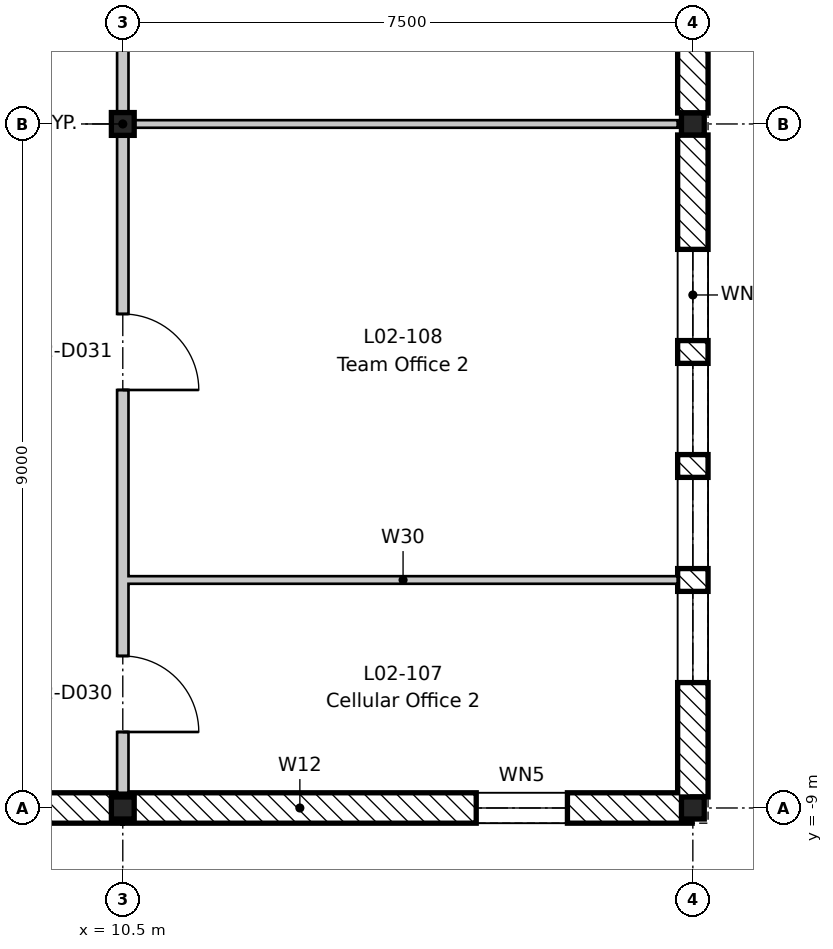
"""IFC4 building model, lengths in metres.
Left out: names, types, materials, properties, quantities, classifications, styles, units other than length and angle.
Written with IfcOpenShell. Run it as: python <this file> out.ifc"""

import sys

from ifc_helpers import new_model, si_unit, direction, frame, frame_2d, origin, origin_2d, place, context, subcontext, project, spatial, rectangle, i_section, extrude, element, fill, save


model = new_model("IFC4")
c1 = context("Model", 3, precision=1e-05, world=origin(), true_north=direction((0.0, 1.0)))
c2 = subcontext(c1, "Body", "Model", "MODEL_VIEW")
j1 = project(units=[si_unit("LENGTHUNIT", "METRE"), si_unit("PLANEANGLEUNIT", "RADIAN")], contexts=[c1])
p1 = place(None, origin())
s1 = spatial("IfcSite", under=j1, at=p1, CompositionType="ELEMENT")
p2 = place(p1, origin())
s2 = spatial("IfcBuilding", under=s1, at=p2, CompositionType="ELEMENT")
p3 = place(p2, frame((0.0, 0.0, 9.9)))
s3 = spatial("IfcBuildingStorey", under=s2, at=p3, CompositionType="ELEMENT", Elevation=9.9)
p4 = place(p3, frame((10.5, -9.0, -0.2), z_axis=(0.0, 0.0, 1.0), x_axis=(1.0, 0.0, 0.0)))
e1 = element("IfcColumn", 1, at=p4, inside=s3, PredefinedType="COLUMN", context=c2, shape_type="SweptSolid", body=[
    extrude(i_section(OverallWidth=0.3, OverallDepth=0.29, WebThickness=0.009, FlangeThickness=0.014, FilletRadius=0.027, at=origin_2d()), origin(), (0.0, 0.0, 1.0), 4.5),
])
p5 = place(p3, frame((10.5, 0.0, -0.2), z_axis=(0.0, 0.0, 1.0), x_axis=(1.0, 0.0, 0.0)))
e2 = element("IfcColumn", 2, at=p5, inside=s3, PredefinedType="COLUMN", context=c2, shape_type="SweptSolid", body=[
    extrude(i_section(OverallWidth=0.3, OverallDepth=0.3, WebThickness=0.011, FlangeThickness=0.019, FilletRadius=0.027, at=origin_2d()), origin(), (0.0, 0.0, 1.0), 4.5),
])
for number, where, z_axis, x_axis in (
    (3, (18.0, -9.0, -0.2), (0.0, 0.0, 1.0), (1.0, 0.0, 0.0)),
    (4, (18.0, 0.0, -0.2), (0.0, 0.0, 1.0), (1.0, 0.0, 0.0)),
):
    element("IfcColumn", number, at=place(p3, frame(where, z_axis=z_axis, x_axis=x_axis)), inside=s3, PredefinedType="COLUMN", context=c2, shape_type="SweptSolid", body=[
        extrude(i_section(OverallWidth=0.3, OverallDepth=0.29, WebThickness=0.009, FlangeThickness=0.014, FilletRadius=0.027, at=origin_2d()), origin(), (0.0, 0.0, 1.0), 4.5),
    ])
p6 = place(p3, frame((18.0, -0.145, 0.0), z_axis=(0.0, 0.0, 1.0), x_axis=(0.0, -1.0, 0.0)))
e5 = element("IfcWall", 5, at=p6, inside=s3, PredefinedType="STANDARD", context=c2, shape_type="SweptSolid", body=[
    extrude(rectangle(XDim=8.71, YDim=0.4, at=frame_2d((4.355, 0.0))), origin(), (0.0, 0.0, 1.0), 3.9),
])
p7 = place(p6, frame((6.005, 0.0, 0.6)))
e6 = element("IfcOpeningElement", 6, at=p7, cuts=e5, PredefinedType="OPENING", context=c2, shape_type="SweptSolid", body=[
    extrude(rectangle(XDim=1.2, YDim=3.0, at=frame_2d((0.6, 1.5))), frame((0.0, 0.21, 0.0), z_axis=(0.0, -1.0, 0.0), x_axis=(1.0, 0.0, 0.0)), (0.0, 0.0, 1.0), 0.42),
])
p8 = place(p6, frame((4.505, 0.0, 0.6)))
e7 = element("IfcOpeningElement", 7, at=p8, cuts=e5, PredefinedType="OPENING", context=c2, shape_type="SweptSolid", body=[
    extrude(rectangle(XDim=1.2, YDim=3.0, at=frame_2d((0.6, 1.5))), frame((0.0, 0.21, 0.0), z_axis=(0.0, -1.0, 0.0), x_axis=(1.0, 0.0, 0.0)), (0.0, 0.0, 1.0), 0.42),
])
p9 = place(p6, frame((3.005, 0.0, 0.6)))
e8 = element("IfcOpeningElement", 8, at=p9, cuts=e5, PredefinedType="OPENING", context=c2, shape_type="SweptSolid", body=[
    extrude(rectangle(XDim=1.2, YDim=3.0, at=frame_2d((0.6, 1.5))), frame((0.0, 0.21, 0.0), z_axis=(0.0, -1.0, 0.0), x_axis=(1.0, 0.0, 0.0)), (0.0, 0.0, 1.0), 0.42),
])
p10 = place(p6, frame((1.505, 0.0, 0.6)))
e9 = element("IfcOpeningElement", 9, at=p10, cuts=e5, PredefinedType="OPENING", context=c2, shape_type="SweptSolid", body=[
    extrude(rectangle(XDim=1.2, YDim=3.0, at=frame_2d((0.6, 1.5))), frame((0.0, 0.21, 0.0), z_axis=(0.0, -1.0, 0.0), x_axis=(1.0, 0.0, 0.0)), (0.0, 0.0, 1.0), 0.42),
])
p11 = place(p3, frame((18.0, 8.855, 0.0), z_axis=(0.0, 0.0, 1.0), x_axis=(0.0, -1.0, 0.0)))
e10 = element("IfcWall", 10, at=p11, inside=s3, PredefinedType="STANDARD", context=c2, shape_type="SweptSolid", body=[
    extrude(rectangle(XDim=8.71, YDim=0.4, at=frame_2d((4.355, 0.0))), origin(), (0.0, 0.0, 1.0), 3.9),
])
p12 = place(p11, frame((6.005, 0.0, 0.6)))
e11 = element("IfcOpeningElement", 11, at=p12, cuts=e10, PredefinedType="OPENING", context=c2, shape_type="SweptSolid", body=[
    extrude(rectangle(XDim=1.2, YDim=3.0, at=frame_2d((0.6, 1.5))), frame((0.0, 0.21, 0.0), z_axis=(0.0, -1.0, 0.0), x_axis=(1.0, 0.0, 0.0)), (0.0, 0.0, 1.0), 0.42),
])
p13 = place(p11, frame((4.505, 0.0, 0.6)))
e12 = element("IfcOpeningElement", 12, at=p13, cuts=e10, PredefinedType="OPENING", context=c2, shape_type="SweptSolid", body=[
    extrude(rectangle(XDim=1.2, YDim=3.0, at=frame_2d((0.6, 1.5))), frame((0.0, 0.21, 0.0), z_axis=(0.0, -1.0, 0.0), x_axis=(1.0, 0.0, 0.0)), (0.0, 0.0, 1.0), 0.42),
])
p14 = place(p11, frame((3.005, 0.0, 0.6)))
e13 = element("IfcOpeningElement", 13, at=p14, cuts=e10, PredefinedType="OPENING", context=c2, shape_type="SweptSolid", body=[
    extrude(rectangle(XDim=1.2, YDim=3.0, at=frame_2d((0.6, 1.5))), frame((0.0, 0.21, 0.0), z_axis=(0.0, -1.0, 0.0), x_axis=(1.0, 0.0, 0.0)), (0.0, 0.0, 1.0), 0.42),
])
p15 = place(p11, frame((1.505, 0.0, 0.6)))
e14 = element("IfcOpeningElement", 14, at=p15, cuts=e10, PredefinedType="OPENING", context=c2, shape_type="SweptSolid", body=[
    extrude(rectangle(XDim=1.2, YDim=3.0, at=frame_2d((0.6, 1.5))), frame((0.0, 0.21, 0.0), z_axis=(0.0, -1.0, 0.0), x_axis=(1.0, 0.0, 0.0)), (0.0, 0.0, 1.0), 0.42),
])
p16 = place(p3, frame((10.491, -9.0, 0.0), z_axis=(0.0, 0.0, 1.0), x_axis=(-1.0, 0.0, 0.0)))
e15 = element("IfcWall", 15, at=p16, inside=s3, PredefinedType="STANDARD", context=c2, shape_type="SweptSolid", body=[
    extrude(rectangle(XDim=2.981, YDim=0.4, at=frame_2d((1.491, 0.0))), origin(), (0.0, 0.0, 1.0), 4.1),
])
p17 = place(p3, frame((17.991, -9.0, 0.0), z_axis=(0.0, 0.0, 1.0), x_axis=(-1.0, 0.0, 0.0)))
e16 = element("IfcWall", 16, at=p17, inside=s3, PredefinedType="STANDARD", context=c2, shape_type="SweptSolid", body=[
    extrude(rectangle(XDim=7.481, YDim=0.4, at=frame_2d((3.741, 0.0))), origin(), (0.0, 0.0, 1.0), 3.97),
])
p18 = place(p17, frame((1.641, 0.0, 0.6)))
e17 = element("IfcOpeningElement", 17, at=p18, cuts=e16, PredefinedType="OPENING", context=c2, shape_type="SweptSolid", body=[
    extrude(rectangle(XDim=1.2, YDim=3.0, at=frame_2d((0.6, 1.5))), frame((0.0, 0.21, 0.0), z_axis=(0.0, -1.0, 0.0), x_axis=(1.0, 0.0, 0.0)), (0.0, 0.0, 1.0), 0.42),
])
p19 = place(p3, frame((10.575, -6.0, 0.0), z_axis=(0.0, 0.0, 1.0), x_axis=(1.0, 0.0, 0.0)))
e18 = element("IfcWall", 18, at=p19, inside=s3, PredefinedType="PARTITIONING", context=c2, shape_type="SweptSolid", body=[
    extrude(rectangle(XDim=7.225, YDim=0.1, at=frame_2d((3.613, 0.0))), origin(), (0.0, 0.0, 1.0), 4.3),
])
p20 = place(p3, frame((10.575, 0.0, 0.0), z_axis=(0.0, 0.0, 1.0), x_axis=(1.0, 0.0, 0.0)))
e19 = element("IfcWall", 19, at=p20, inside=s3, PredefinedType="PARTITIONING", context=c2, shape_type="SweptSolid", body=[
    extrude(rectangle(XDim=7.225, YDim=0.1, at=frame_2d((3.613, 0.0))), origin(), (0.0, 0.0, 1.0), 3.95),
])
p21 = place(p3, frame((10.5, -8.8, 0.0), z_axis=(0.0, 0.0, 1.0), x_axis=(0.0, 1.0, 0.0)))
e20 = element("IfcWall", 20, at=p21, inside=s3, PredefinedType="PARTITIONING", context=c2, shape_type="SweptSolid", body=[
    extrude(rectangle(XDim=79.3, YDim=0.15, at=frame_2d((39.65, 0.0))), origin(), (0.0, 0.0, 1.0), 3.78),
])
p22 = place(p21, frame((0.8, 0.0, 0.0)))
e21 = element("IfcOpeningElement", 21, at=p22, cuts=e20, PredefinedType="OPENING", context=c2, shape_type="SweptSolid", body=[
    extrude(rectangle(XDim=1.0, YDim=2.1, at=frame_2d((0.5, 1.05))), frame((0.0, 0.085, 0.0), z_axis=(0.0, -1.0, 0.0), x_axis=(1.0, 0.0, 0.0)), (0.0, 0.0, 1.0), 0.17),
])
p23 = place(p21, frame((5.3, 0.0, 0.0)))
e22 = element("IfcOpeningElement", 22, at=p23, cuts=e20, PredefinedType="OPENING", context=c2, shape_type="SweptSolid", body=[
    extrude(rectangle(XDim=1.0, YDim=2.1, at=frame_2d((0.5, 1.05))), frame((0.0, 0.085, 0.0), z_axis=(0.0, -1.0, 0.0), x_axis=(1.0, 0.0, 0.0)), (0.0, 0.0, 1.0), 0.17),
])
p24 = place(p21, frame((9.8, 0.0, 0.0)))
e23 = element("IfcOpeningElement", 23, at=p24, cuts=e20, PredefinedType="OPENING", context=c2, shape_type="SweptSolid", body=[
    extrude(rectangle(XDim=1.0, YDim=2.1, at=frame_2d((0.5, 1.05))), frame((0.0, 0.085, 0.0), z_axis=(0.0, -1.0, 0.0), x_axis=(1.0, 0.0, 0.0)), (0.0, 0.0, 1.0), 0.17),
])
p25 = place(p21, frame((12.8, 0.0, 0.0)))
e24 = element("IfcOpeningElement", 24, at=p25, cuts=e20, PredefinedType="OPENING", context=c2, shape_type="SweptSolid", body=[
    extrude(rectangle(XDim=1.0, YDim=2.1, at=frame_2d((0.5, 1.05))), frame((0.0, 0.085, 0.0), z_axis=(0.0, -1.0, 0.0), x_axis=(1.0, 0.0, 0.0)), (0.0, 0.0, 1.0), 0.17),
])
p26 = place(p21, frame((15.8, 0.0, 0.0)))
e25 = element("IfcOpeningElement", 25, at=p26, cuts=e20, PredefinedType="OPENING", context=c2, shape_type="SweptSolid", body=[
    extrude(rectangle(XDim=1.0, YDim=2.1, at=frame_2d((0.5, 1.05))), frame((0.0, 0.085, 0.0), z_axis=(0.0, -1.0, 0.0), x_axis=(1.0, 0.0, 0.0)), (0.0, 0.0, 1.0), 0.17),
])
p27 = place(p21, frame((20.3, 0.0, 0.0)))
e26 = element("IfcOpeningElement", 26, at=p27, cuts=e20, PredefinedType="OPENING", context=c2, shape_type="SweptSolid", body=[
    extrude(rectangle(XDim=1.0, YDim=2.1, at=frame_2d((0.5, 1.05))), frame((0.0, 0.085, 0.0), z_axis=(0.0, -1.0, 0.0), x_axis=(1.0, 0.0, 0.0)), (0.0, 0.0, 1.0), 0.17),
])
p28 = place(p21, frame((24.8, 0.0, 0.0)))
e27 = element("IfcOpeningElement", 27, at=p28, cuts=e20, PredefinedType="OPENING", context=c2, shape_type="SweptSolid", body=[
    extrude(rectangle(XDim=1.0, YDim=2.1, at=frame_2d((0.5, 1.05))), frame((0.0, 0.085, 0.0), z_axis=(0.0, -1.0, 0.0), x_axis=(1.0, 0.0, 0.0)), (0.0, 0.0, 1.0), 0.17),
])
p29 = place(p21, frame((27.8, 0.0, 0.0)))
e28 = element("IfcOpeningElement", 28, at=p29, cuts=e20, PredefinedType="OPENING", context=c2, shape_type="SweptSolid", body=[
    extrude(rectangle(XDim=1.0, YDim=2.1, at=frame_2d((0.5, 1.05))), frame((0.0, 0.085, 0.0), z_axis=(0.0, -1.0, 0.0), x_axis=(1.0, 0.0, 0.0)), (0.0, 0.0, 1.0), 0.17),
])
p30 = place(p21, frame((32.3, 0.0, 0.0)))
e29 = element("IfcOpeningElement", 29, at=p30, cuts=e20, PredefinedType="OPENING", context=c2, shape_type="SweptSolid", body=[
    extrude(rectangle(XDim=1.0, YDim=2.1, at=frame_2d((0.5, 1.05))), frame((0.0, 0.085, 0.0), z_axis=(0.0, -1.0, 0.0), x_axis=(1.0, 0.0, 0.0)), (0.0, 0.0, 1.0), 0.17),
])
p31 = place(p21, frame((38.3, 0.0, 0.0)))
e30 = element("IfcOpeningElement", 30, at=p31, cuts=e20, PredefinedType="OPENING", context=c2, shape_type="SweptSolid", body=[
    extrude(rectangle(XDim=1.0, YDim=2.1, at=frame_2d((0.5, 1.05))), frame((0.0, 0.085, 0.0), z_axis=(0.0, -1.0, 0.0), x_axis=(1.0, 0.0, 0.0)), (0.0, 0.0, 1.0), 0.17),
])
p32 = place(p21, frame((42.8, 0.0, 0.0)))
e31 = element("IfcOpeningElement", 31, at=p32, cuts=e20, PredefinedType="OPENING", context=c2, shape_type="SweptSolid", body=[
    extrude(rectangle(XDim=1.0, YDim=2.1, at=frame_2d((0.5, 1.05))), frame((0.0, 0.085, 0.0), z_axis=(0.0, -1.0, 0.0), x_axis=(1.0, 0.0, 0.0)), (0.0, 0.0, 1.0), 0.17),
])
p33 = place(p21, frame((45.8, 0.0, 0.0)))
e32 = element("IfcOpeningElement", 32, at=p33, cuts=e20, PredefinedType="OPENING", context=c2, shape_type="SweptSolid", body=[
    extrude(rectangle(XDim=1.0, YDim=2.1, at=frame_2d((0.5, 1.05))), frame((0.0, 0.085, 0.0), z_axis=(0.0, -1.0, 0.0), x_axis=(1.0, 0.0, 0.0)), (0.0, 0.0, 1.0), 0.17),
])
p34 = place(p21, frame((50.3, 0.0, 0.0)))
e33 = element("IfcOpeningElement", 33, at=p34, cuts=e20, PredefinedType="OPENING", context=c2, shape_type="SweptSolid", body=[
    extrude(rectangle(XDim=1.0, YDim=2.1, at=frame_2d((0.5, 1.05))), frame((0.0, 0.085, 0.0), z_axis=(0.0, -1.0, 0.0), x_axis=(1.0, 0.0, 0.0)), (0.0, 0.0, 1.0), 0.17),
])
p35 = place(p21, frame((54.8, 0.0, 0.0)))
e34 = element("IfcOpeningElement", 34, at=p35, cuts=e20, PredefinedType="OPENING", context=c2, shape_type="SweptSolid", body=[
    extrude(rectangle(XDim=1.0, YDim=2.1, at=frame_2d((0.5, 1.05))), frame((0.0, 0.085, 0.0), z_axis=(0.0, -1.0, 0.0), x_axis=(1.0, 0.0, 0.0)), (0.0, 0.0, 1.0), 0.17),
])
p36 = place(p21, frame((57.8, 0.0, 0.0)))
e35 = element("IfcOpeningElement", 35, at=p36, cuts=e20, PredefinedType="OPENING", context=c2, shape_type="SweptSolid", body=[
    extrude(rectangle(XDim=1.0, YDim=2.1, at=frame_2d((0.5, 1.05))), frame((0.0, 0.085, 0.0), z_axis=(0.0, -1.0, 0.0), x_axis=(1.0, 0.0, 0.0)), (0.0, 0.0, 1.0), 0.17),
])
p37 = place(p21, frame((63.6, 0.0, 0.0)))
e36 = element("IfcOpeningElement", 36, at=p37, cuts=e20, PredefinedType="OPENING", context=c2, shape_type="SweptSolid", body=[
    extrude(rectangle(XDim=1.4, YDim=2.1, at=frame_2d((0.7, 1.05))), frame((0.0, 0.085, 0.0), z_axis=(0.0, -1.0, 0.0), x_axis=(1.0, 0.0, 0.0)), (0.0, 0.0, 1.0), 0.17),
])
p38 = place(p21, frame((69.8, 0.0, 0.0)))
e37 = element("IfcOpeningElement", 37, at=p38, cuts=e20, PredefinedType="OPENING", context=c2, shape_type="SweptSolid", body=[
    extrude(rectangle(XDim=1.0, YDim=2.1, at=frame_2d((0.5, 1.05))), frame((0.0, 0.085, 0.0), z_axis=(0.0, -1.0, 0.0), x_axis=(1.0, 0.0, 0.0)), (0.0, 0.0, 1.0), 0.17),
])
p39 = place(p21, frame((72.8, 0.0, 0.0)))
e38 = element("IfcOpeningElement", 38, at=p39, cuts=e20, PredefinedType="OPENING", context=c2, shape_type="SweptSolid", body=[
    extrude(rectangle(XDim=1.0, YDim=2.1, at=frame_2d((0.5, 1.05))), frame((0.0, 0.085, 0.0), z_axis=(0.0, -1.0, 0.0), x_axis=(1.0, 0.0, 0.0)), (0.0, 0.0, 1.0), 0.17),
])
p40 = place(p7, origin())
e39 = element("IfcWindow", 39, at=p40, inside=s3, PartitioningType="SINGLE_PANEL", PredefinedType="WINDOW", context=c2, shape_type="SweptSolid", body=[
    extrude(rectangle(XDim=1.2, YDim=3.0, at=frame_2d((0.6, 1.5))), frame((0.0, 0.03, 0.0), z_axis=(0.0, -1.0, 0.0), x_axis=(1.0, 0.0, 0.0)), (0.0, 0.0, 1.0), 0.06),
])
fill(e6, e39)
p41 = place(p8, origin())
e40 = element("IfcWindow", 40, at=p41, inside=s3, PartitioningType="SINGLE_PANEL", PredefinedType="WINDOW", context=c2, shape_type="SweptSolid", body=[
    extrude(rectangle(XDim=1.2, YDim=3.0, at=frame_2d((0.6, 1.5))), frame((0.0, 0.03, 0.0), z_axis=(0.0, -1.0, 0.0), x_axis=(1.0, 0.0, 0.0)), (0.0, 0.0, 1.0), 0.06),
])
fill(e7, e40)
p42 = place(p9, origin())
e41 = element("IfcWindow", 41, at=p42, inside=s3, PartitioningType="SINGLE_PANEL", PredefinedType="WINDOW", context=c2, shape_type="SweptSolid", body=[
    extrude(rectangle(XDim=1.2, YDim=3.0, at=frame_2d((0.6, 1.5))), frame((0.0, 0.03, 0.0), z_axis=(0.0, -1.0, 0.0), x_axis=(1.0, 0.0, 0.0)), (0.0, 0.0, 1.0), 0.06),
])
fill(e8, e41)
p43 = place(p10, origin())
e42 = element("IfcWindow", 42, at=p43, inside=s3, PartitioningType="SINGLE_PANEL", PredefinedType="WINDOW", context=c2, shape_type="SweptSolid", body=[
    extrude(rectangle(XDim=1.2, YDim=3.0, at=frame_2d((0.6, 1.5))), frame((0.0, 0.03, 0.0), z_axis=(0.0, -1.0, 0.0), x_axis=(1.0, 0.0, 0.0)), (0.0, 0.0, 1.0), 0.06),
])
fill(e9, e42)
p44 = place(p18, origin())
e43 = element("IfcWindow", 43, at=p44, inside=s3, PartitioningType="SINGLE_PANEL", PredefinedType="WINDOW", context=c2, shape_type="SweptSolid", body=[
    extrude(rectangle(XDim=1.2, YDim=3.0, at=frame_2d((0.6, 1.5))), frame((0.0, 0.03, 0.0), z_axis=(0.0, -1.0, 0.0), x_axis=(1.0, 0.0, 0.0)), (0.0, 0.0, 1.0), 0.06),
])
fill(e17, e43)
p45 = place(p22, frame((1.0, 0.0, 0.0), z_axis=(0.0, 0.0, 1.0), x_axis=(-1.0, 0.0, 0.0)))
e44 = element("IfcDoor", 44, at=p45, inside=s3, OperationType="SINGLE_SWING_RIGHT", PredefinedType="DOOR", context=c2, shape_type="SweptSolid", body=[
    extrude(rectangle(XDim=1.0, YDim=2.1, at=frame_2d((0.5, 1.05))), frame((0.0, 0.025, 0.0), z_axis=(0.0, -1.0, 0.0), x_axis=(1.0, 0.0, 0.0)), (0.0, 0.0, 1.0), 0.05),
])
fill(e21, e44)
p46 = place(p23, frame((1.0, 0.0, 0.0), z_axis=(0.0, 0.0, 1.0), x_axis=(-1.0, 0.0, 0.0)))
e45 = element("IfcDoor", 45, at=p46, inside=s3, OperationType="SINGLE_SWING_RIGHT", PredefinedType="DOOR", context=c2, shape_type="SweptSolid", body=[
    extrude(rectangle(XDim=1.0, YDim=2.1, at=frame_2d((0.5, 1.05))), frame((0.0, 0.025, 0.0), z_axis=(0.0, -1.0, 0.0), x_axis=(1.0, 0.0, 0.0)), (0.0, 0.0, 1.0), 0.05),
])
fill(e22, e45)
save(model, sys.argv[1])
